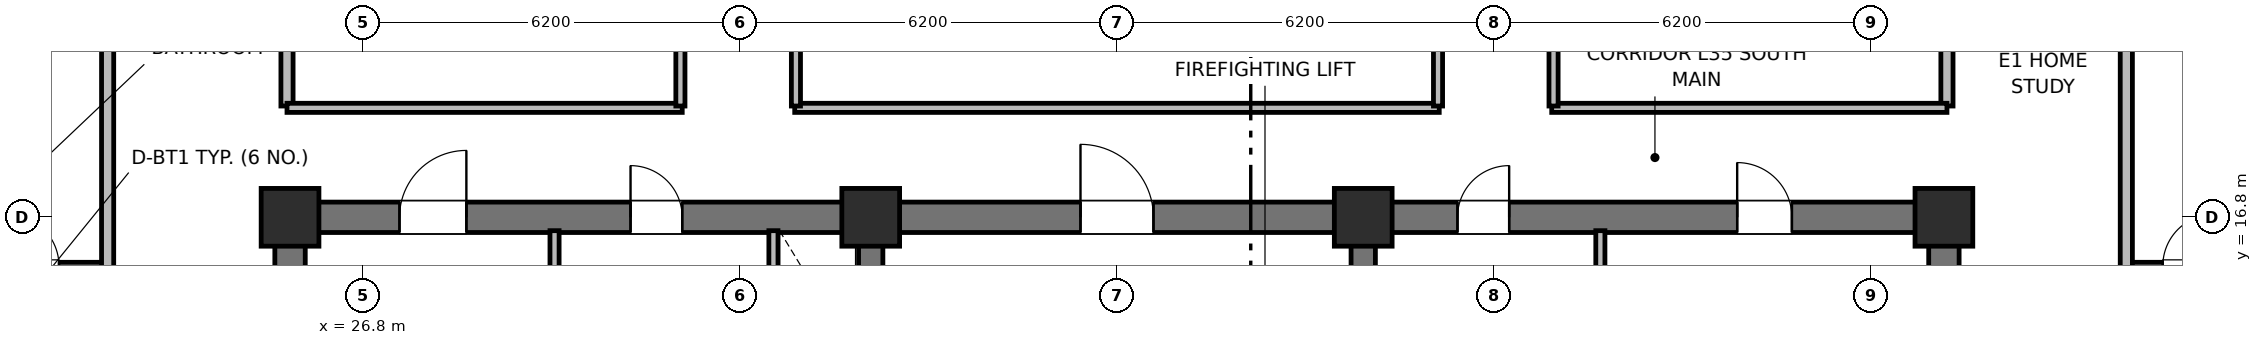
"""IFC4 building model, lengths in metres.
Left out: names, types, materials, properties, quantities, classifications, styles, units other than length and angle.
Written with IfcOpenShell. Run it as: python <this file> out.ifc"""

import sys

from ifc_helpers import new_model, si_unit, direction, frame, frame_2d, origin, origin_2d, place, context, subcontext, project, spatial, rectangle, extrude, element, fill, save


model = new_model("IFC4")
c1 = context("Model", 3, precision=1e-05, world=origin(), true_north=direction((0.0, 1.0)))
c2 = subcontext(c1, "Body", "Model", "MODEL_VIEW")
j1 = project(units=[si_unit("LENGTHUNIT", "METRE"), si_unit("PLANEANGLEUNIT", "RADIAN")], contexts=[c1])
p1 = place(None, origin())
s1 = spatial("IfcSite", under=j1, at=p1, CompositionType="ELEMENT")
p2 = place(p1, origin())
s2 = spatial("IfcBuilding", under=s1, at=p2, CompositionType="ELEMENT")
p3 = place(p2, frame((0.0, 0.0, 143.6)))
s3 = spatial("IfcBuildingStorey", under=s2, at=p3, CompositionType="ELEMENT", Elevation=143.6)
for number, where, z_axis, x_axis in (
    (1, (25.6, 10.85, 0.0), (0.0, 0.0, 1.0), (0.0, 1.0, 0.0)),
    (2, (52.8, 10.85, 0.0), (0.0, 0.0, 1.0), (0.0, 1.0, 0.0)),
):
    element("IfcWall", number, at=place(p3, frame(where, z_axis=z_axis, x_axis=x_axis)), inside=s3, PredefinedType="SHEAR", context=c2, shape_type="SweptSolid", body=[
        extrude(rectangle(XDim=5.7, YDim=0.5, at=frame_2d((2.85, 0.0))), origin(), (0.0, 0.0, 1.0), 4.2),
    ])
p4 = place(p3, frame((25.6, 16.8, 0.0), z_axis=(0.0, 0.0, 1.0), x_axis=(1.0, 0.0, 0.0)))
e3 = element("IfcWall", 3, at=p4, inside=s3, PredefinedType="SHEAR", context=c2, shape_type="SweptSolid", body=[
    extrude(rectangle(XDim=27.2, YDim=0.5, at=frame_2d((13.6, 0.0))), origin(), (0.0, 0.0, 1.0), 4.2),
])
p5 = place(p4, frame((1.8, 0.0, 0.0)))
e4 = element("IfcOpeningElement", 4, at=p5, cuts=e3, PredefinedType="OPENING", context=c2, shape_type="SweptSolid", body=[
    extrude(rectangle(XDim=1.1, YDim=2.15, at=frame_2d((0.55, 1.075))), frame((0.0, 0.26, 0.0), z_axis=(0.0, -1.0, 0.0), x_axis=(1.0, 0.0, 0.0)), (0.0, 0.0, 1.0), 0.52),
])
p6 = place(p4, frame((5.6, 0.0, 0.0)))
e5 = element("IfcOpeningElement", 5, at=p6, cuts=e3, PredefinedType="OPENING", context=c2, shape_type="SweptSolid", body=[
    extrude(rectangle(XDim=0.85, YDim=2.1, at=frame_2d((0.425, 1.05))), frame((0.0, 0.26, 0.0), z_axis=(0.0, -1.0, 0.0), x_axis=(1.0, 0.0, 0.0)), (0.0, 0.0, 1.0), 0.52),
])
p7 = place(p4, frame((13.0, 0.0, 0.0)))
e6 = element("IfcOpeningElement", 6, at=p7, cuts=e3, PredefinedType="OPENING", context=c2, shape_type="SweptSolid", body=[
    extrude(rectangle(XDim=1.2, YDim=2.15, at=frame_2d((0.6, 1.075))), frame((0.0, 0.26, 0.0), z_axis=(0.0, -1.0, 0.0), x_axis=(1.0, 0.0, 0.0)), (0.0, 0.0, 1.0), 0.52),
])
p8 = place(p4, frame((19.2, 0.0, 0.0)))
e7 = element("IfcOpeningElement", 7, at=p8, cuts=e3, PredefinedType="OPENING", context=c2, shape_type="SweptSolid", body=[
    extrude(rectangle(XDim=0.85, YDim=2.1, at=frame_2d((0.425, 1.05))), frame((0.0, 0.26, 0.0), z_axis=(0.0, -1.0, 0.0), x_axis=(1.0, 0.0, 0.0)), (0.0, 0.0, 1.0), 0.52),
])
p9 = place(p4, frame((23.8, 0.0, 0.0)))
e8 = element("IfcOpeningElement", 8, at=p9, cuts=e3, PredefinedType="OPENING", context=c2, shape_type="SweptSolid", body=[
    extrude(rectangle(XDim=0.9, YDim=2.1, at=frame_2d((0.45, 1.05))), frame((0.0, 0.26, 0.0), z_axis=(0.0, -1.0, 0.0), x_axis=(1.0, 0.0, 0.0)), (0.0, 0.0, 1.0), 0.52),
])
for number, where, z_axis, x_axis in (
    (9, (35.15, 10.85, 0.0), (0.0, 0.0, 1.0), (0.0, 1.0, 0.0)),
    (10, (43.25, 10.85, 0.0), (0.0, 0.0, 1.0), (0.0, 1.0, 0.0)),
):
    element("IfcWall", number, at=place(p3, frame(where, z_axis=z_axis, x_axis=x_axis)), inside=s3, PredefinedType="SHEAR", context=c2, shape_type="SweptSolid", body=[
        extrude(rectangle(XDim=5.7, YDim=0.4, at=frame_2d((2.85, 0.0))), origin(), (0.0, 0.0, 1.0), 4.2),
    ])
for number, where, z_axis, x_axis in (
    (11, (25.6, 16.8, 0.0), (0.0, 0.0, 1.0), (1.0, 0.0, 0.0)),
    (12, (35.15, 16.8, 0.0), (0.0, 0.0, 1.0), (1.0, 0.0, 0.0)),
    (13, (43.25, 16.8, 0.0), (0.0, 0.0, 1.0), (1.0, 0.0, 0.0)),
    (14, (52.8, 16.8, 0.0), (0.0, 0.0, 1.0), (1.0, 0.0, 0.0)),
):
    element("IfcColumn", number, at=place(p3, frame(where, z_axis=z_axis, x_axis=x_axis)), inside=s3, PredefinedType="COLUMN", context=c2, shape_type="SweptSolid", body=[
        extrude(rectangle(XDim=0.95, YDim=0.95, at=origin_2d()), origin(), (0.0, 0.0, 1.0), 4.2),
    ])
p10 = place(p3, frame((29.95, 14.5, 0.0), z_axis=(0.0, 0.0, 1.0), x_axis=(0.0, 1.0, 0.0)))
e15 = element("IfcWall", 15, at=p10, inside=s3, PredefinedType="PARTITIONING", context=c2, shape_type="SweptSolid", body=[
    extrude(rectangle(XDim=2.08, YDim=0.15, at=frame_2d((1.04, 0.0))), origin(), (0.0, 0.0, 1.0), 3.05),
])
p11 = place(p3, frame((33.55, 14.5, 0.0), z_axis=(0.0, 0.0, 1.0), x_axis=(0.0, 1.0, 0.0)))
e16 = element("IfcWall", 16, at=p11, inside=s3, PredefinedType="PARTITIONING", context=c2, shape_type="SweptSolid", body=[
    extrude(rectangle(XDim=2.08, YDim=0.15, at=frame_2d((1.04, 0.0))), origin(), (0.0, 0.0, 1.0), 3.05),
])
p12 = place(p11, frame((0.55, 0.0, 0.0)))
e17 = element("IfcOpeningElement", 17, at=p12, cuts=e16, PredefinedType="OPENING", context=c2, shape_type="SweptSolid", body=[
    extrude(rectangle(XDim=0.85, YDim=2.05, at=frame_2d((0.425, 1.025))), frame((0.0, 0.085, 0.0), z_axis=(0.0, -1.0, 0.0), x_axis=(1.0, 0.0, 0.0)), (0.0, 0.0, 1.0), 0.17),
])
p13 = place(p3, frame((47.15, 10.95, 0.0), z_axis=(0.0, 0.0, 1.0), x_axis=(0.0, 1.0, 0.0)))
e18 = element("IfcWall", 18, at=p13, inside=s3, PredefinedType="PARTITIONING", context=c2, shape_type="SweptSolid", body=[
    extrude(rectangle(XDim=5.63, YDim=0.15, at=frame_2d((2.815, 0.0))), origin(), (0.0, 0.0, 1.0), 3.05),
])
for number, where, z_axis, x_axis in (
    (19, (25.55, 18.63, 0.0), (0.0, 0.0, 1.0), (0.0, 1.0, 0.0)),
    (20, (52.85, 18.63, 0.0), (0.0, 0.0, 1.0), (0.0, 1.0, 0.0)),
):
    element("IfcWall", number, at=place(p3, frame(where, z_axis=z_axis, x_axis=x_axis)), inside=s3, PredefinedType="PARTITIONING", context=c2, shape_type="SweptSolid", body=[
        extrude(rectangle(XDim=19.14, YDim=0.2, at=frame_2d((9.57, 0.0))), origin(), (0.0, 0.0, 1.0), 3.05),
    ])
p14 = place(p3, frame((25.55, 18.6, 0.0), z_axis=(0.0, 0.0, 1.0), x_axis=(1.0, 0.0, 0.0)))
e21 = element("IfcWall", 21, at=p14, inside=s3, PredefinedType="PARTITIONING", context=c2, shape_type="SweptSolid", body=[
    extrude(rectangle(XDim=6.5, YDim=0.15, at=frame_2d((3.25, 0.0))), origin(), (0.0, 0.0, 1.0), 3.05),
])
p15 = place(p3, frame((33.9, 18.6, 0.0), z_axis=(0.0, 0.0, 1.0), x_axis=(1.0, 0.0, 0.0)))
e22 = element("IfcWall", 22, at=p15, inside=s3, PredefinedType="PARTITIONING", context=c2, shape_type="SweptSolid", body=[
    extrude(rectangle(XDim=10.6, YDim=0.15, at=frame_2d((5.3, 0.0))), origin(), (0.0, 0.0, 1.0), 3.05),
])
p16 = place(p3, frame((46.35, 18.6, 0.0), z_axis=(0.0, 0.0, 1.0), x_axis=(1.0, 0.0, 0.0)))
e23 = element("IfcWall", 23, at=p16, inside=s3, PredefinedType="PARTITIONING", context=c2, shape_type="SweptSolid", body=[
    extrude(rectangle(XDim=6.5, YDim=0.15, at=frame_2d((3.25, 0.0))), origin(), (0.0, 0.0, 1.0), 3.05),
])
p17 = place(p3, frame((32.02, 18.63, 0.0), z_axis=(0.0, 0.0, 1.0), x_axis=(0.0, 1.0, 0.0)))
e24 = element("IfcWall", 24, at=p17, inside=s3, PredefinedType="PARTITIONING", context=c2, shape_type="SweptSolid", body=[
    extrude(rectangle(XDim=19.14, YDim=0.15, at=frame_2d((9.57, 0.0))), origin(), (0.0, 0.0, 1.0), 3.05),
])
p18 = place(p17, frame((5.5, 0.0, 0.0)))
e25 = element("IfcOpeningElement", 25, at=p18, cuts=e24, PredefinedType="OPENING", context=c2, shape_type="SweptSolid", body=[
    extrude(rectangle(XDim=1.3, YDim=2.2, at=frame_2d((0.65, 1.1))), frame((0.0, 0.085, 0.0), z_axis=(0.0, -1.0, 0.0), x_axis=(1.0, 0.0, 0.0)), (0.0, 0.0, 1.0), 0.17),
])
p19 = place(p3, frame((33.92, 18.63, 0.0), z_axis=(0.0, 0.0, 1.0), x_axis=(0.0, 1.0, 0.0)))
e26 = element("IfcWall", 26, at=p19, inside=s3, PredefinedType="PARTITIONING", context=c2, shape_type="SweptSolid", body=[
    extrude(rectangle(XDim=19.14, YDim=0.15, at=frame_2d((9.57, 0.0))), origin(), (0.0, 0.0, 1.0), 3.05),
])
p20 = place(p19, frame((4.5, 0.0, 0.0)))
e27 = element("IfcOpeningElement", 27, at=p20, cuts=e26, PredefinedType="OPENING", context=c2, shape_type="SweptSolid", body=[
    extrude(rectangle(XDim=1.3, YDim=2.2, at=frame_2d((0.65, 1.1))), frame((0.0, 0.085, 0.0), z_axis=(0.0, -1.0, 0.0), x_axis=(1.0, 0.0, 0.0)), (0.0, 0.0, 1.0), 0.17),
])
p21 = place(p3, frame((44.48, 18.63, 0.0), z_axis=(0.0, 0.0, 1.0), x_axis=(0.0, 1.0, 0.0)))
e28 = element("IfcWall", 28, at=p21, inside=s3, PredefinedType="PARTITIONING", context=c2, shape_type="SweptSolid", body=[
    extrude(rectangle(XDim=19.14, YDim=0.15, at=frame_2d((9.57, 0.0))), origin(), (0.0, 0.0, 1.0), 3.05),
])
p22 = place(p3, frame((46.38, 18.63, 0.0), z_axis=(0.0, 0.0, 1.0), x_axis=(0.0, 1.0, 0.0)))
e29 = element("IfcWall", 29, at=p22, inside=s3, PredefinedType="PARTITIONING", context=c2, shape_type="SweptSolid", body=[
    extrude(rectangle(XDim=19.14, YDim=0.15, at=frame_2d((9.57, 0.0))), origin(), (0.0, 0.0, 1.0), 3.05),
])
p23 = place(p22, frame((6.5, 0.0, 0.0)))
e30 = element("IfcOpeningElement", 30, at=p23, cuts=e29, PredefinedType="OPENING", context=c2, shape_type="SweptSolid", body=[
    extrude(rectangle(XDim=1.0, YDim=2.15, at=frame_2d((0.5, 1.075))), frame((0.0, 0.085, 0.0), z_axis=(0.0, -1.0, 0.0), x_axis=(1.0, 0.0, 0.0)), (0.0, 0.0, 1.0), 0.17),
])
p24 = place(p3, frame((20.35, 16.0, 0.0), z_axis=(0.0, 0.0, 1.0), x_axis=(1.0, 0.0, 0.0)))
e31 = element("IfcWall", 31, at=p24, inside=s3, PredefinedType="PARTITIONING", context=c2, shape_type="SweptSolid", body=[
    extrude(rectangle(XDim=2.25, YDim=0.12, at=frame_2d((1.125, 0.0))), origin(), (0.0, 0.0, 1.0), 3.05),
])
p25 = place(p24, frame((0.6, 0.0, 0.0)))
e32 = element("IfcOpeningElement", 32, at=p25, cuts=e31, PredefinedType="OPENING", context=c2, shape_type="SweptSolid", body=[
    extrude(rectangle(XDim=0.85, YDim=2.1, at=frame_2d((0.425, 1.05))), frame((0.0, 0.07, 0.0), z_axis=(0.0, -1.0, 0.0), x_axis=(1.0, 0.0, 0.0)), (0.0, 0.0, 1.0), 0.14),
])
p26 = place(p3, frame((22.6, 10.6, 0.0), z_axis=(0.0, 0.0, 1.0), x_axis=(0.0, 1.0, 0.0)))
e33 = element("IfcWall", 33, at=p26, inside=s3, PredefinedType="PARTITIONING", context=c2, shape_type="SweptSolid", body=[
    extrude(rectangle(XDim=35.2, YDim=0.2, at=frame_2d((17.6, 0.0))), origin(), (0.0, 0.0, 1.0), 3.05),
])
p27 = place(p26, frame((2.65, 0.0, 0.0)))
e34 = element("IfcOpeningElement", 34, at=p27, cuts=e33, PredefinedType="OPENING", context=c2, shape_type="SweptSolid", body=[
    extrude(rectangle(XDim=1.0, YDim=2.15, at=frame_2d((0.5, 1.075))), frame((0.0, 0.11, 0.0), z_axis=(0.0, -1.0, 0.0), x_axis=(1.0, 0.0, 0.0)), (0.0, 0.0, 1.0), 0.22),
])
p28 = place(p26, frame((12.65, 0.0, 0.0)))
e35 = element("IfcOpeningElement", 35, at=p28, cuts=e33, PredefinedType="OPENING", context=c2, shape_type="SweptSolid", body=[
    extrude(rectangle(XDim=1.0, YDim=2.15, at=frame_2d((0.5, 1.075))), frame((0.0, 0.11, 0.0), z_axis=(0.0, -1.0, 0.0), x_axis=(1.0, 0.0, 0.0)), (0.0, 0.0, 1.0), 0.22),
])
p29 = place(p26, frame((24.134, 0.0, 0.0)))
e36 = element("IfcOpeningElement", 36, at=p29, cuts=e33, PredefinedType="OPENING", context=c2, shape_type="SweptSolid", body=[
    extrude(rectangle(XDim=1.0, YDim=2.15, at=frame_2d((0.5, 1.075))), frame((0.0, 0.11, 0.0), z_axis=(0.0, -1.0, 0.0), x_axis=(1.0, 0.0, 0.0)), (0.0, 0.0, 1.0), 0.22),
])
p30 = place(p3, frame((55.8, 16.0, 0.0), z_axis=(0.0, 0.0, 1.0), x_axis=(1.0, 0.0, 0.0)))
e37 = element("IfcWall", 37, at=p30, inside=s3, PredefinedType="PARTITIONING", context=c2, shape_type="SweptSolid", body=[
    extrude(rectangle(XDim=2.25, YDim=0.12, at=frame_2d((1.125, 0.0))), origin(), (0.0, 0.0, 1.0), 3.05),
])
p31 = place(p30, frame((0.6, 0.0, 0.0)))
e38 = element("IfcOpeningElement", 38, at=p31, cuts=e37, PredefinedType="OPENING", context=c2, shape_type="SweptSolid", body=[
    extrude(rectangle(XDim=0.85, YDim=2.1, at=frame_2d((0.425, 1.05))), frame((0.0, 0.07, 0.0), z_axis=(0.0, -1.0, 0.0), x_axis=(1.0, 0.0, 0.0)), (0.0, 0.0, 1.0), 0.14),
])
p32 = place(p3, frame((55.8, 10.6, 0.0), z_axis=(0.0, 0.0, 1.0), x_axis=(0.0, 1.0, 0.0)))
e39 = element("IfcWall", 39, at=p32, inside=s3, PredefinedType="PARTITIONING", context=c2, shape_type="SweptSolid", body=[
    extrude(rectangle(XDim=35.2, YDim=0.2, at=frame_2d((17.6, 0.0))), origin(), (0.0, 0.0, 1.0), 3.05),
])
p33 = place(p32, frame((2.65, 0.0, 0.0)))
e40 = element("IfcOpeningElement", 40, at=p33, cuts=e39, PredefinedType="OPENING", context=c2, shape_type="SweptSolid", body=[
    extrude(rectangle(XDim=1.0, YDim=2.15, at=frame_2d((0.5, 1.075))), frame((0.0, 0.11, 0.0), z_axis=(0.0, -1.0, 0.0), x_axis=(1.0, 0.0, 0.0)), (0.0, 0.0, 1.0), 0.22),
])
p34 = place(p32, frame((12.518, 0.0, 0.0)))
e41 = element("IfcOpeningElement", 41, at=p34, cuts=e39, PredefinedType="OPENING", context=c2, shape_type="SweptSolid", body=[
    extrude(rectangle(XDim=1.0, YDim=2.15, at=frame_2d((0.5, 1.075))), frame((0.0, 0.11, 0.0), z_axis=(0.0, -1.0, 0.0), x_axis=(1.0, 0.0, 0.0)), (0.0, 0.0, 1.0), 0.22),
])
p35 = place(p32, frame((23.65, 0.0, 0.0)))
e42 = element("IfcOpeningElement", 42, at=p35, cuts=e39, PredefinedType="OPENING", context=c2, shape_type="SweptSolid", body=[
    extrude(rectangle(XDim=1.0, YDim=2.15, at=frame_2d((0.5, 1.075))), frame((0.0, 0.11, 0.0), z_axis=(0.0, -1.0, 0.0), x_axis=(1.0, 0.0, 0.0)), (0.0, 0.0, 1.0), 0.22),
])
p36 = place(p25, origin())
e43 = element("IfcDoor", 43, at=p36, inside=s3, OperationType="SINGLE_SWING_LEFT", PredefinedType="DOOR", context=c2, shape_type="SweptSolid", body=[
    extrude(rectangle(XDim=0.85, YDim=2.1, at=frame_2d((0.425, 1.05))), frame((0.0, 0.025, 0.0), z_axis=(0.0, -1.0, 0.0), x_axis=(1.0, 0.0, 0.0)), (0.0, 0.0, 1.0), 0.05),
])
fill(e32, e43)
p37 = place(p31, origin())
e44 = element("IfcDoor", 44, at=p37, inside=s3, OperationType="SINGLE_SWING_RIGHT", PredefinedType="DOOR", context=c2, shape_type="SweptSolid", body=[
    extrude(rectangle(XDim=0.85, YDim=2.1, at=frame_2d((0.425, 1.05))), frame((0.0, 0.025, 0.0), z_axis=(0.0, -1.0, 0.0), x_axis=(1.0, 0.0, 0.0)), (0.0, 0.0, 1.0), 0.05),
])
fill(e38, e44)
p38 = place(p5, origin())
e45 = element("IfcDoor", 45, at=p38, inside=s3, OperationType="SINGLE_SWING_RIGHT", PredefinedType="DOOR", context=c2, shape_type="SweptSolid", body=[
    extrude(rectangle(XDim=1.1, YDim=2.15, at=frame_2d((0.55, 1.075))), frame((0.0, 0.025, 0.0), z_axis=(0.0, -1.0, 0.0), x_axis=(1.0, 0.0, 0.0)), (0.0, 0.0, 1.0), 0.05),
])
fill(e4, e45)
p39 = place(p6, origin())
e46 = element("IfcDoor", 46, at=p39, inside=s3, OperationType="SINGLE_SWING_LEFT", PredefinedType="DOOR", context=c2, shape_type="SweptSolid", body=[
    extrude(rectangle(XDim=0.85, YDim=2.1, at=frame_2d((0.425, 1.05))), frame((0.0, 0.025, 0.0), z_axis=(0.0, -1.0, 0.0), x_axis=(1.0, 0.0, 0.0)), (0.0, 0.0, 1.0), 0.05),
])
fill(e5, e46)
p40 = place(p7, origin())
e47 = element("IfcDoor", 47, at=p40, inside=s3, OperationType="SINGLE_SWING_LEFT", PredefinedType="DOOR", context=c2, shape_type="SweptSolid", body=[
    extrude(rectangle(XDim=1.2, YDim=2.15, at=frame_2d((0.6, 1.075))), frame((0.0, 0.025, 0.0), z_axis=(0.0, -1.0, 0.0), x_axis=(1.0, 0.0, 0.0)), (0.0, 0.0, 1.0), 0.05),
])
fill(e6, e47)
p41 = place(p8, origin())
e48 = element("IfcDoor", 48, at=p41, inside=s3, OperationType="SINGLE_SWING_RIGHT", PredefinedType="DOOR", context=c2, shape_type="SweptSolid", body=[
    extrude(rectangle(XDim=0.85, YDim=2.1, at=frame_2d((0.425, 1.05))), frame((0.0, 0.025, 0.0), z_axis=(0.0, -1.0, 0.0), x_axis=(1.0, 0.0, 0.0)), (0.0, 0.0, 1.0), 0.05),
])
fill(e7, e48)
p42 = place(p9, origin())
e49 = element("IfcDoor", 49, at=p42, inside=s3, OperationType="SINGLE_SWING_LEFT", PredefinedType="DOOR", context=c2, shape_type="SweptSolid", body=[
    extrude(rectangle(XDim=0.9, YDim=2.1, at=frame_2d((0.45, 1.05))), frame((0.0, 0.025, 0.0), z_axis=(0.0, -1.0, 0.0), x_axis=(1.0, 0.0, 0.0)), (0.0, 0.0, 1.0), 0.05),
])
fill(e8, e49)
save(model, sys.argv[1])
